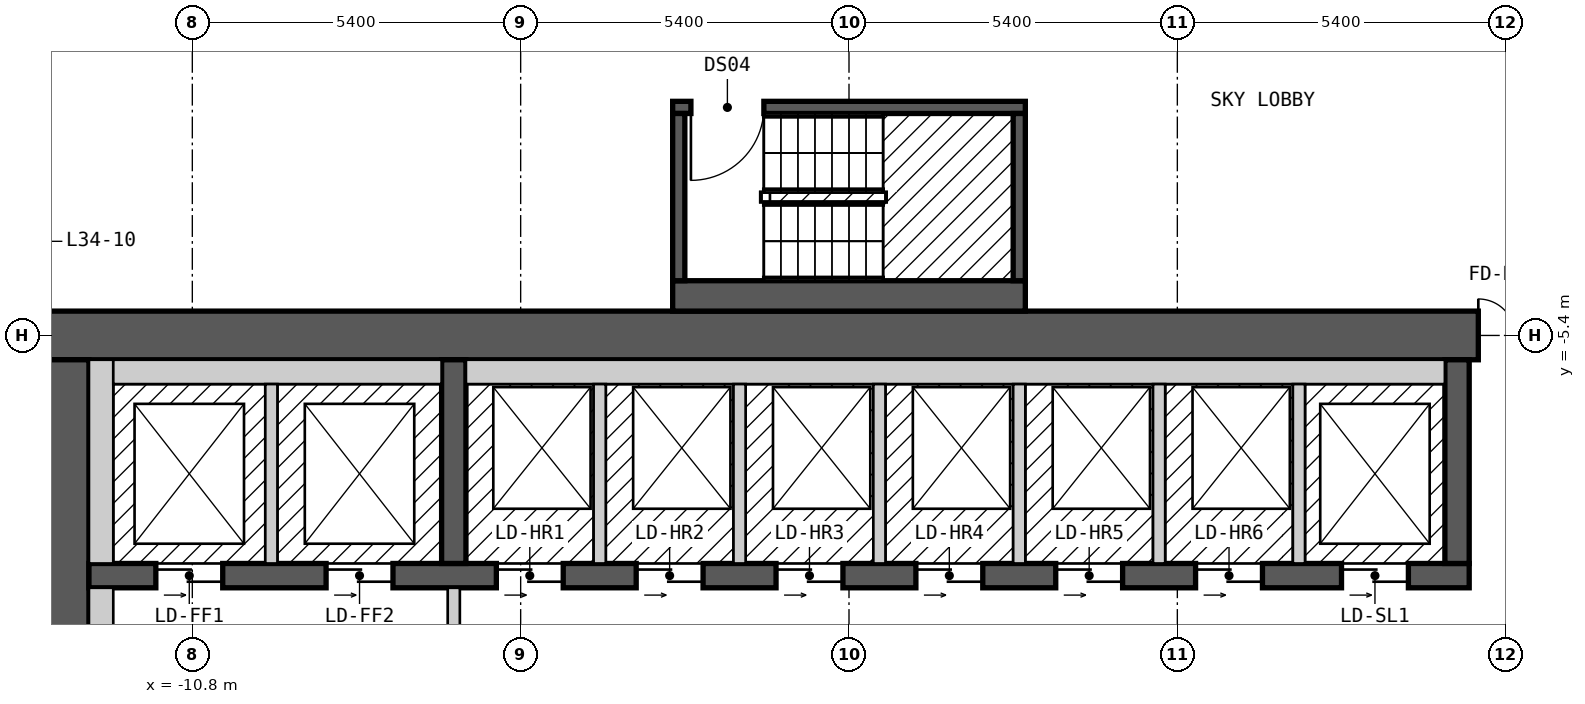
"""IFC4 building model, lengths in metres.
Left out: names, types, materials, properties, quantities, classifications, styles, units other than length and angle.
Written with IfcOpenShell. Run it as: python <this file> out.ifc"""

import sys

from ifc_helpers import new_model, si_unit, direction, frame, frame_2d, origin, place, context, subcontext, project, spatial, rectangle, extrude, element, fill, save


model = new_model("IFC4")
c1 = context("Model", 3, precision=1e-05, world=origin(), true_north=direction((0.0, 1.0)))
c2 = subcontext(c1, "Body", "Model", "MODEL_VIEW")
j1 = project(units=[si_unit("LENGTHUNIT", "METRE"), si_unit("PLANEANGLEUNIT", "RADIAN")], contexts=[c1])
p1 = place(None, origin())
s1 = spatial("IfcSite", under=j1, at=p1, CompositionType="ELEMENT")
p2 = place(p1, origin())
s2 = spatial("IfcBuilding", under=s1, at=p2, CompositionType="ELEMENT")
p3 = place(p2, frame((0.0, 0.0, 111.6)))
s3 = spatial("IfcBuildingStorey", under=s2, at=p3, CompositionType="ELEMENT", Elevation=111.6)
p4 = place(p3, frame((-13.3, -5.4, 0.0), z_axis=(0.0, 0.0, 1.0), x_axis=(1.0, 0.0, 0.0)))
e1 = element("IfcWall", 1, at=p4, inside=s3, PredefinedType="SHEAR", context=c2, shape_type="SweptSolid", body=[
    extrude(rectangle(XDim=26.6, YDim=0.8, at=frame_2d((13.3, 0.0))), origin(), (0.0, 0.0, 1.0), 5.7),
])
p5 = place(p4, frame((23.65, 0.0, 0.0)))
e2 = element("IfcOpeningElement", 2, at=p5, cuts=e1, PredefinedType="OPENING", context=c2, shape_type="SweptSolid", body=[
    extrude(rectangle(XDim=1.2, YDim=2.1, at=frame_2d((0.6, 1.05))), frame((0.0, 0.41, 0.0), z_axis=(0.0, -1.0, 0.0), x_axis=(1.0, 0.0, 0.0)), (0.0, 0.0, 1.0), 0.82),
])
p6 = place(p3, frame((-12.9, -18.2, 0.0), z_axis=(0.0, 0.0, 1.0), x_axis=(0.0, 1.0, 0.0)))
e3 = element("IfcWall", 3, at=p6, inside=s3, PredefinedType="SHEAR", context=c2, shape_type="SweptSolid", body=[
    extrude(rectangle(XDim=12.4, YDim=0.8, at=frame_2d((6.2, 0.0))), origin(), (0.0, 0.0, 1.0), 5.7),
])
p7 = place(p6, frame((4.0, 0.0, 0.0)))
e4 = element("IfcOpeningElement", 4, at=p7, cuts=e3, PredefinedType="OPENING", context=c2, shape_type="SweptSolid", body=[
    extrude(rectangle(XDim=1.2, YDim=2.1, at=frame_2d((0.6, 1.05))), frame((0.0, 0.41, 0.0), z_axis=(0.0, -1.0, 0.0), x_axis=(1.0, 0.0, 0.0)), (0.0, 0.0, 1.0), 0.82),
])
p8 = place(p3, frame((-12.5, -9.35, 0.0), z_axis=(0.0, 0.0, 1.0), x_axis=(1.0, 0.0, 0.0)))
e5 = element("IfcWall", 5, at=p8, inside=s3, PredefinedType="SHEAR", context=c2, shape_type="SweptSolid", body=[
    extrude(rectangle(XDim=22.7, YDim=0.4, at=frame_2d((11.35, 0.0))), origin(), (0.0, 0.0, 1.0), 5.7),
])
p9 = place(p8, frame((1.1, 0.0, 0.0)))
e6 = element("IfcOpeningElement", 6, at=p9, cuts=e5, PredefinedType="OPENING", context=c2, shape_type="SweptSolid", body=[
    extrude(rectangle(XDim=1.1, YDim=2.1, at=frame_2d((0.55, 1.05))), frame((0.0, 0.21, 0.0), z_axis=(0.0, -1.0, 0.0), x_axis=(1.0, 0.0, 0.0)), (0.0, 0.0, 1.0), 0.42),
])
p10 = place(p8, frame((3.9, 0.0, 0.0)))
e7 = element("IfcOpeningElement", 7, at=p10, cuts=e5, PredefinedType="OPENING", context=c2, shape_type="SweptSolid", body=[
    extrude(rectangle(XDim=1.1, YDim=2.1, at=frame_2d((0.55, 1.05))), frame((0.0, 0.21, 0.0), z_axis=(0.0, -1.0, 0.0), x_axis=(1.0, 0.0, 0.0)), (0.0, 0.0, 1.0), 0.42),
])
p11 = place(p8, frame((6.7, 0.0, 0.0)))
e8 = element("IfcOpeningElement", 8, at=p11, cuts=e5, PredefinedType="OPENING", context=c2, shape_type="SweptSolid", body=[
    extrude(rectangle(XDim=1.1, YDim=2.1, at=frame_2d((0.55, 1.05))), frame((0.0, 0.21, 0.0), z_axis=(0.0, -1.0, 0.0), x_axis=(1.0, 0.0, 0.0)), (0.0, 0.0, 1.0), 0.42),
])
p12 = place(p8, frame((9.0, 0.0, 0.0)))
e9 = element("IfcOpeningElement", 9, at=p12, cuts=e5, PredefinedType="OPENING", context=c2, shape_type="SweptSolid", body=[
    extrude(rectangle(XDim=1.1, YDim=2.1, at=frame_2d((0.55, 1.05))), frame((0.0, 0.21, 0.0), z_axis=(0.0, -1.0, 0.0), x_axis=(1.0, 0.0, 0.0)), (0.0, 0.0, 1.0), 0.42),
])
p13 = place(p8, frame((11.3, 0.0, 0.0)))
e10 = element("IfcOpeningElement", 10, at=p13, cuts=e5, PredefinedType="OPENING", context=c2, shape_type="SweptSolid", body=[
    extrude(rectangle(XDim=1.1, YDim=2.1, at=frame_2d((0.55, 1.05))), frame((0.0, 0.21, 0.0), z_axis=(0.0, -1.0, 0.0), x_axis=(1.0, 0.0, 0.0)), (0.0, 0.0, 1.0), 0.42),
])
p14 = place(p8, frame((13.6, 0.0, 0.0)))
e11 = element("IfcOpeningElement", 11, at=p14, cuts=e5, PredefinedType="OPENING", context=c2, shape_type="SweptSolid", body=[
    extrude(rectangle(XDim=1.1, YDim=2.1, at=frame_2d((0.55, 1.05))), frame((0.0, 0.21, 0.0), z_axis=(0.0, -1.0, 0.0), x_axis=(1.0, 0.0, 0.0)), (0.0, 0.0, 1.0), 0.42),
])
p15 = place(p8, frame((15.9, 0.0, 0.0)))
e12 = element("IfcOpeningElement", 12, at=p15, cuts=e5, PredefinedType="OPENING", context=c2, shape_type="SweptSolid", body=[
    extrude(rectangle(XDim=1.1, YDim=2.1, at=frame_2d((0.55, 1.05))), frame((0.0, 0.21, 0.0), z_axis=(0.0, -1.0, 0.0), x_axis=(1.0, 0.0, 0.0)), (0.0, 0.0, 1.0), 0.42),
])
p16 = place(p8, frame((18.2, 0.0, 0.0)))
e13 = element("IfcOpeningElement", 13, at=p16, cuts=e5, PredefinedType="OPENING", context=c2, shape_type="SweptSolid", body=[
    extrude(rectangle(XDim=1.1, YDim=2.1, at=frame_2d((0.55, 1.05))), frame((0.0, 0.21, 0.0), z_axis=(0.0, -1.0, 0.0), x_axis=(1.0, 0.0, 0.0)), (0.0, 0.0, 1.0), 0.42),
])
p17 = place(p8, frame((20.6, 0.0, 0.0)))
e14 = element("IfcOpeningElement", 14, at=p17, cuts=e5, PredefinedType="OPENING", context=c2, shape_type="SweptSolid", body=[
    extrude(rectangle(XDim=1.1, YDim=2.1, at=frame_2d((0.55, 1.05))), frame((0.0, 0.21, 0.0), z_axis=(0.0, -1.0, 0.0), x_axis=(1.0, 0.0, 0.0)), (0.0, 0.0, 1.0), 0.42),
])
for number, where, z_axis, x_axis in (
    (15, (-6.5, -9.15, 0.0), (0.0, 0.0, 1.0), (0.0, 1.0, 0.0)),
    (16, (10.0, -9.15, 0.0), (0.0, 0.0, 1.0), (0.0, 1.0, 0.0)),
):
    element("IfcWall", number, at=place(p3, frame(where, z_axis=z_axis, x_axis=x_axis)), inside=s3, PredefinedType="SHEAR", context=c2, shape_type="SweptSolid", body=[
        extrude(rectangle(XDim=3.35, YDim=0.4, at=frame_2d((1.675, 0.0))), origin(), (0.0, 0.0, 1.0), 5.7),
    ])
p18 = place(p3, frame((-2.9, -4.75, 0.0), z_axis=(0.0, 0.0, 1.0), x_axis=(1.0, 0.0, 0.0)))
e17 = element("IfcWall", 17, at=p18, inside=s3, PredefinedType="SOLIDWALL", context=c2, shape_type="SweptSolid", body=[
    extrude(rectangle(XDim=5.8, YDim=0.5, at=frame_2d((2.9, 0.0))), origin(), (0.0, 0.0, 1.0), 5.7),
])
p19 = place(p3, frame((-2.9, -1.65, 0.0), z_axis=(0.0, 0.0, 1.0), x_axis=(1.0, 0.0, 0.0)))
e18 = element("IfcWall", 18, at=p19, inside=s3, PredefinedType="SOLIDWALL", context=c2, shape_type="SweptSolid", body=[
    extrude(rectangle(XDim=5.8, YDim=0.2, at=frame_2d((2.9, 0.0))), origin(), (0.0, 0.0, 1.0), 5.7),
])
p20 = place(p19, frame((0.3, 0.0, 0.0)))
e19 = element("IfcOpeningElement", 19, at=p20, cuts=e18, PredefinedType="OPENING", context=c2, shape_type="SweptSolid", body=[
    extrude(rectangle(XDim=1.2, YDim=2.1, at=frame_2d((0.6, 1.05))), frame((0.0, 0.11, 0.0), z_axis=(0.0, -1.0, 0.0), x_axis=(1.0, 0.0, 0.0)), (0.0, 0.0, 1.0), 0.22),
])
for number, where, z_axis, x_axis in (
    (20, (-2.8, -4.5, 0.0), (0.0, 0.0, 1.0), (0.0, 1.0, 0.0)),
    (21, (2.8, -4.5, 0.0), (0.0, 0.0, 1.0), (0.0, 1.0, 0.0)),
):
    element("IfcWall", number, at=place(p3, frame(where, z_axis=z_axis, x_axis=x_axis)), inside=s3, PredefinedType="SOLIDWALL", context=c2, shape_type="SweptSolid", body=[
        extrude(rectangle(XDim=2.75, YDim=0.2, at=frame_2d((1.375, 0.0))), origin(), (0.0, 0.0, 1.0), 5.7),
    ])
p21 = place(p3, frame((-12.3, -13.0, 0.0), z_axis=(0.0, 0.0, 1.0), x_axis=(0.0, 1.0, 0.0)))
e22 = element("IfcWall", 22, at=p21, inside=s3, PredefinedType="PARTITIONING", context=c2, shape_type="SweptSolid", body=[
    extrude(rectangle(XDim=3.45, YDim=0.4, at=frame_2d((1.725, 0.0))), origin(), (0.0, 0.0, 1.0), 5.7),
])
p22 = place(p3, frame((-12.3, -9.15, 0.0), z_axis=(0.0, 0.0, 1.0), x_axis=(0.0, 1.0, 0.0)))
e23 = element("IfcWall", 23, at=p22, inside=s3, PredefinedType="SOLIDWALL", context=c2, shape_type="SweptSolid", body=[
    extrude(rectangle(XDim=3.35, YDim=0.4, at=frame_2d((1.675, 0.0))), origin(), (0.0, 0.0, 1.0), 5.7),
])
p23 = place(p3, frame((-12.1, -6.0, 0.0), z_axis=(0.0, 0.0, 1.0), x_axis=(1.0, 0.0, 0.0)))
e24 = element("IfcWall", 24, at=p23, inside=s3, PredefinedType="SOLIDWALL", context=c2, shape_type="SweptSolid", body=[
    extrude(rectangle(XDim=5.4, YDim=0.4, at=frame_2d((2.7, 0.0))), origin(), (0.0, 0.0, 1.0), 5.7),
])
p24 = place(p3, frame((-9.5, -9.15, 0.0), z_axis=(0.0, 0.0, 1.0), x_axis=(0.0, 1.0, 0.0)))
e25 = element("IfcWall", 25, at=p24, inside=s3, PredefinedType="SOLIDWALL", context=c2, shape_type="SweptSolid", body=[
    extrude(rectangle(XDim=2.95, YDim=0.2, at=frame_2d((1.475, 0.0))), origin(), (0.0, 0.0, 1.0), 5.7),
])
p25 = place(p3, frame((-6.5, -14.45, 0.0), z_axis=(0.0, 0.0, 1.0), x_axis=(0.0, 1.0, 0.0)))
e26 = element("IfcWall", 26, at=p25, inside=s3, PredefinedType="PARTITIONING", context=c2, shape_type="SweptSolid", body=[
    extrude(rectangle(XDim=4.9, YDim=0.2, at=frame_2d((2.45, 0.0))), origin(), (0.0, 0.0, 1.0), 5.7),
])
p26 = place(p25, frame((3.15, 0.0, 0.0), z_axis=(0.0, 0.0, 1.0), x_axis=(-1.0, 0.0, 0.0)))
e27 = element("IfcOpeningElement", 27, at=p26, cuts=e26, PredefinedType="OPENING", context=c2, shape_type="SweptSolid", body=[
    extrude(rectangle(XDim=1.4, YDim=2.1, at=frame_2d((0.7, 1.05))), frame((0.0, 0.11, 0.0), z_axis=(0.0, -1.0, 0.0), x_axis=(1.0, 0.0, 0.0)), (0.0, 0.0, 1.0), 0.22),
])
p27 = place(p3, frame((-6.3, -6.0, 0.0), z_axis=(0.0, 0.0, 1.0), x_axis=(1.0, 0.0, 0.0)))
e28 = element("IfcWall", 28, at=p27, inside=s3, PredefinedType="SOLIDWALL", context=c2, shape_type="SweptSolid", body=[
    extrude(rectangle(XDim=16.1, YDim=0.4, at=frame_2d((8.05, 0.0))), origin(), (0.0, 0.0, 1.0), 5.7),
])
for number, where, z_axis, x_axis in (
    (29, (-4.1, -9.15, 0.0), (0.0, 0.0, 1.0), (0.0, 1.0, 0.0)),
    (30, (-1.8, -9.15, 0.0), (0.0, 0.0, 1.0), (0.0, 1.0, 0.0)),
    (31, (0.5, -9.15, 0.0), (0.0, 0.0, 1.0), (0.0, 1.0, 0.0)),
    (32, (2.8, -9.15, 0.0), (0.0, 0.0, 1.0), (0.0, 1.0, 0.0)),
    (33, (5.1, -9.15, 0.0), (0.0, 0.0, 1.0), (0.0, 1.0, 0.0)),
    (34, (7.4, -9.15, 0.0), (0.0, 0.0, 1.0), (0.0, 1.0, 0.0)),
):
    element("IfcWall", number, at=place(p3, frame(where, z_axis=z_axis, x_axis=x_axis)), inside=s3, PredefinedType="SOLIDWALL", context=c2, shape_type="SweptSolid", body=[
        extrude(rectangle(XDim=2.95, YDim=0.2, at=frame_2d((1.475, 0.0))), origin(), (0.0, 0.0, 1.0), 5.7),
    ])
p28 = place(p20, origin())
e35 = element("IfcDoor", 35, at=p28, inside=s3, OperationType="SINGLE_SWING_LEFT", PredefinedType="DOOR", context=c2, shape_type="SweptSolid", body=[
    extrude(rectangle(XDim=1.2, YDim=2.1, at=frame_2d((0.6, 1.05))), frame((0.0, 0.025, 0.0), z_axis=(0.0, -1.0, 0.0), x_axis=(1.0, 0.0, 0.0)), (0.0, 0.0, 1.0), 0.05),
])
fill(e19, e35)
p29 = place(p9, origin())
e36 = element("IfcDoor", 36, at=p29, inside=s3, OperationType="DOUBLE_DOOR_SLIDING", PredefinedType="DOOR", context=c2, shape_type="SweptSolid", body=[
    extrude(rectangle(XDim=1.1, YDim=2.1, at=frame_2d((0.55, 1.05))), frame((0.0, 0.025, 0.0), z_axis=(0.0, -1.0, 0.0), x_axis=(1.0, 0.0, 0.0)), (0.0, 0.0, 1.0), 0.05),
])
fill(e6, e36)
p30 = place(p10, origin())
e37 = element("IfcDoor", 37, at=p30, inside=s3, OperationType="DOUBLE_DOOR_SLIDING", PredefinedType="DOOR", context=c2, shape_type="SweptSolid", body=[
    extrude(rectangle(XDim=1.1, YDim=2.1, at=frame_2d((0.55, 1.05))), frame((0.0, 0.025, 0.0), z_axis=(0.0, -1.0, 0.0), x_axis=(1.0, 0.0, 0.0)), (0.0, 0.0, 1.0), 0.05),
])
fill(e7, e37)
p31 = place(p11, origin())
e38 = element("IfcDoor", 38, at=p31, inside=s3, OperationType="DOUBLE_DOOR_SLIDING", PredefinedType="DOOR", context=c2, shape_type="SweptSolid", body=[
    extrude(rectangle(XDim=1.1, YDim=2.1, at=frame_2d((0.55, 1.05))), frame((0.0, 0.025, 0.0), z_axis=(0.0, -1.0, 0.0), x_axis=(1.0, 0.0, 0.0)), (0.0, 0.0, 1.0), 0.05),
])
fill(e8, e38)
p32 = place(p12, origin())
e39 = element("IfcDoor", 39, at=p32, inside=s3, OperationType="DOUBLE_DOOR_SLIDING", PredefinedType="DOOR", context=c2, shape_type="SweptSolid", body=[
    extrude(rectangle(XDim=1.1, YDim=2.1, at=frame_2d((0.55, 1.05))), frame((0.0, 0.025, 0.0), z_axis=(0.0, -1.0, 0.0), x_axis=(1.0, 0.0, 0.0)), (0.0, 0.0, 1.0), 0.05),
])
fill(e9, e39)
p33 = place(p13, origin())
e40 = element("IfcDoor", 40, at=p33, inside=s3, OperationType="DOUBLE_DOOR_SLIDING", PredefinedType="DOOR", context=c2, shape_type="SweptSolid", body=[
    extrude(rectangle(XDim=1.1, YDim=2.1, at=frame_2d((0.55, 1.05))), frame((0.0, 0.025, 0.0), z_axis=(0.0, -1.0, 0.0), x_axis=(1.0, 0.0, 0.0)), (0.0, 0.0, 1.0), 0.05),
])
fill(e10, e40)
p34 = place(p14, origin())
e41 = element("IfcDoor", 41, at=p34, inside=s3, OperationType="DOUBLE_DOOR_SLIDING", PredefinedType="DOOR", context=c2, shape_type="SweptSolid", body=[
    extrude(rectangle(XDim=1.1, YDim=2.1, at=frame_2d((0.55, 1.05))), frame((0.0, 0.025, 0.0), z_axis=(0.0, -1.0, 0.0), x_axis=(1.0, 0.0, 0.0)), (0.0, 0.0, 1.0), 0.05),
])
fill(e11, e41)
p35 = place(p15, origin())
e42 = element("IfcDoor", 42, at=p35, inside=s3, OperationType="DOUBLE_DOOR_SLIDING", PredefinedType="DOOR", context=c2, shape_type="SweptSolid", body=[
    extrude(rectangle(XDim=1.1, YDim=2.1, at=frame_2d((0.55, 1.05))), frame((0.0, 0.025, 0.0), z_axis=(0.0, -1.0, 0.0), x_axis=(1.0, 0.0, 0.0)), (0.0, 0.0, 1.0), 0.05),
])
fill(e12, e42)
p36 = place(p16, origin())
e43 = element("IfcDoor", 43, at=p36, inside=s3, OperationType="DOUBLE_DOOR_SLIDING", PredefinedType="DOOR", context=c2, shape_type="SweptSolid", body=[
    extrude(rectangle(XDim=1.1, YDim=2.1, at=frame_2d((0.55, 1.05))), frame((0.0, 0.025, 0.0), z_axis=(0.0, -1.0, 0.0), x_axis=(1.0, 0.0, 0.0)), (0.0, 0.0, 1.0), 0.05),
])
fill(e13, e43)
p37 = place(p17, origin())
e44 = element("IfcDoor", 44, at=p37, inside=s3, OperationType="DOUBLE_DOOR_SLIDING", PredefinedType="DOOR", context=c2, shape_type="SweptSolid", body=[
    extrude(rectangle(XDim=1.1, YDim=2.1, at=frame_2d((0.55, 1.05))), frame((0.0, 0.025, 0.0), z_axis=(0.0, -1.0, 0.0), x_axis=(1.0, 0.0, 0.0)), (0.0, 0.0, 1.0), 0.05),
])
fill(e14, e44)
p38 = place(p5, origin())
e45 = element("IfcDoor", 45, at=p38, inside=s3, OperationType="DOUBLE_DOOR_SINGLE_SWING", PredefinedType="DOOR", context=c2, shape_type="SweptSolid", body=[
    extrude(rectangle(XDim=1.2, YDim=2.1, at=frame_2d((0.6, 1.05))), frame((0.0, 0.025, 0.0), z_axis=(0.0, -1.0, 0.0), x_axis=(1.0, 0.0, 0.0)), (0.0, 0.0, 1.0), 0.05),
])
fill(e2, e45)
save(model, sys.argv[1])
